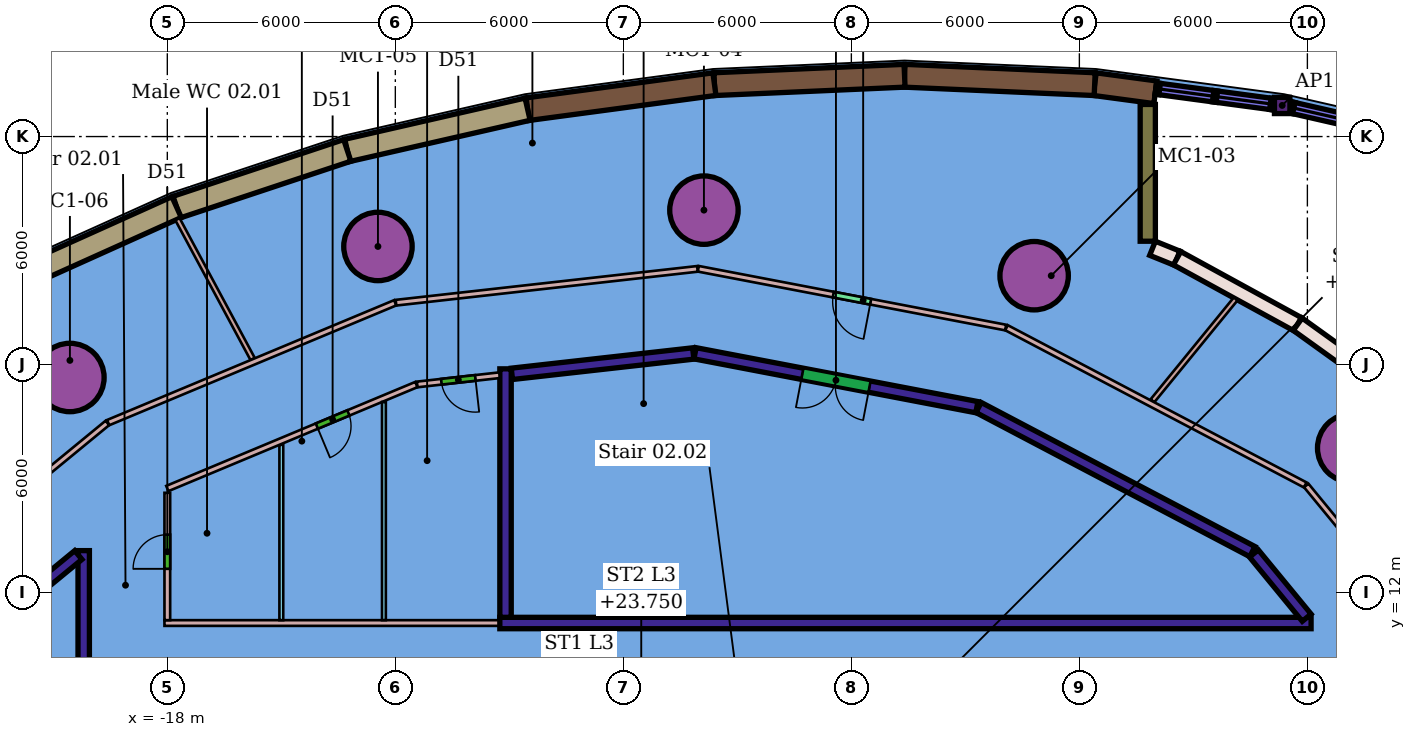
"""IFC4 building model, lengths in metres.
Left out: names, types, materials, properties, quantities, classifications, styles, units other than length and angle.
Written with IfcOpenShell. Run it as: python <this file> out.ifc"""

import sys

from ifc_helpers import new_model, si_unit, direction, frame, frame_2d, origin, origin_2d, place, context, subcontext, project, spatial, rectangle, hollow_circle, i_section, extrude, element, fill, save


model = new_model("IFC4")
c1 = context("Model", 3, precision=1e-05, world=origin(), true_north=direction((0.0, 1.0)))
c2 = subcontext(c1, "Body", "Model", "MODEL_VIEW")
j1 = project(units=[si_unit("LENGTHUNIT", "METRE"), si_unit("PLANEANGLEUNIT", "RADIAN")], contexts=[c1])
p1 = place(None, origin())
s1 = spatial("IfcSite", under=j1, at=p1, CompositionType="ELEMENT")
p2 = place(p1, origin())
s2 = spatial("IfcBuilding", under=s1, at=p2, CompositionType="ELEMENT")
p3 = place(p2, frame((0.0, 0.0, 17.0)))
s3 = spatial("IfcBuildingStorey", under=s2, at=p3, CompositionType="ELEMENT", Elevation=17.0)
for number, where, z_axis, x_axis in (
    (1, (13.166, 15.805, 0.0), (0.0, 0.0, 1.0), (1.0, 0.0, 0.0)),
    (2, (4.81, 20.339, 0.0), (0.0, 0.0, 1.0), (1.0, 0.0, 0.0)),
    (3, (-3.879, 22.064, 0.0), (0.0, 0.0, 1.0), (1.0, 0.0, 0.0)),
    (4, (-12.458, 21.108, 0.0), (0.0, 0.0, 1.0), (1.0, 0.0, 0.0)),
    (5, (-20.563, 17.66, 0.0), (0.0, 0.0, 1.0), (1.0, 0.0, 0.0)),
):
    element("IfcColumn", number, at=place(p3, frame(where, z_axis=z_axis, x_axis=x_axis)), inside=s3, PredefinedType="COLUMN", context=c2, shape_type="SweptSolid", body=[
        extrude(hollow_circle(Radius=0.9, WallThickness=0.06, at=origin_2d()), origin(), (0.0, 0.0, 1.0), 8.8),
    ])
p4 = place(p3, frame((11.337, 24.819, 0.0), z_axis=(0.0, 0.0, 1.0), x_axis=(1.0, 0.0, 0.0)))
e6 = element("IfcColumn", 6, at=p4, inside=s3, PredefinedType="COLUMN", context=c2, shape_type="SweptSolid", body=[
    extrude(i_section(OverallWidth=0.407, OverallDepth=0.428, WebThickness=0.02, FlangeThickness=0.035, at=origin_2d()), origin(), (0.0, 0.0, 1.0), 8.8),
])
p5 = place(p3, frame((-18.075, 11.2, 0.0), z_axis=(0.0, 0.0, 1.0), x_axis=(1.0, 0.0, 0.0)))
e7 = element("IfcWall", 7, at=p5, inside=s3, PredefinedType="PARTITIONING", context=c2, shape_type="SweptSolid", body=[
    extrude(rectangle(XDim=8.825, YDim=0.15, at=frame_2d((4.413, 0.0))), origin(), (0.0, 0.0, 1.0), 8.35),
])
p6 = place(p3, frame((-9.25, 11.2, 0.0), z_axis=(0.0, 0.0, 1.0), x_axis=(1.0, 0.0, 0.0)))
e8 = element("IfcWall", 8, at=p6, inside=s3, PredefinedType="PARTITIONING", context=c2, shape_type="SweptSolid", body=[
    extrude(rectangle(XDim=21.348, YDim=0.3, at=frame_2d((10.674, 0.0))), origin(), (0.0, 0.0, 1.0), 8.35),
])
p7 = place(p3, frame((-20.2, -9.15, 0.0), z_axis=(0.0, 0.0, 1.0), x_axis=(0.0, 1.0, 0.0)))
e9 = element("IfcWall", 9, at=p7, inside=s3, PredefinedType="PARTITIONING", context=c2, shape_type="SweptSolid", body=[
    extrude(rectangle(XDim=22.255, YDim=0.3, at=frame_2d((11.127, 0.0))), origin(), (0.0, 0.0, 1.0), 8.35),
])
p8 = place(p3, frame((-18.0, 11.275, 0.0), z_axis=(0.0, 0.0, 1.0), x_axis=(0.0, 1.0, 0.0)))
e10 = element("IfcWall", 10, at=p8, inside=s3, PredefinedType="PARTITIONING", context=c2, shape_type="SweptSolid", body=[
    extrude(rectangle(XDim=3.351, YDim=0.15, at=frame_2d((1.676, 0.0))), origin(), (0.0, 0.0, 1.0), 8.35),
])
p9 = place(p8, frame((1.351, 0.0, 0.0)))
e11 = element("IfcOpeningElement", 11, at=p9, cuts=e10, PredefinedType="OPENING", context=c2, shape_type="SweptSolid", body=[
    extrude(rectangle(XDim=0.9, YDim=2.1, at=frame_2d((0.45, 1.05))), frame((0.0, 0.085, 0.0), z_axis=(0.0, -1.0, 0.0), x_axis=(1.0, 0.0, 0.0)), (0.0, 0.0, 1.0), 0.17),
])
p10 = place(p3, frame((-15.0, 11.275, 0.0), z_axis=(0.0, 0.0, 1.0), x_axis=(0.0, 1.0, 0.0)))
e12 = element("IfcWall", 12, at=p10, inside=s3, PredefinedType="PARTITIONING", context=c2, shape_type="SweptSolid", body=[
    extrude(rectangle(XDim=4.614, YDim=0.1, at=frame_2d((2.307, 0.0))), origin(), (0.0, 0.0, 1.0), 8.35),
])
p11 = place(p3, frame((-11.447, 17.475, 0.0), z_axis=(0.0, 0.0, 1.0), x_axis=(-0.922815313154, -0.385242647961, 0.0)))
e13 = element("IfcWall", 13, at=p11, inside=s3, PredefinedType="PARTITIONING", context=c2, shape_type="SweptSolid", body=[
    extrude(rectangle(XDim=7.102, YDim=0.15, at=frame_2d((3.551, 0.0))), origin(), (0.0, 0.0, 1.0), 8.35),
])
p12 = place(p11, frame((1.938, 0.0, 0.0)))
e14 = element("IfcOpeningElement", 14, at=p12, cuts=e13, PredefinedType="OPENING", context=c2, shape_type="SweptSolid", body=[
    extrude(rectangle(XDim=0.9, YDim=2.1, at=frame_2d((0.45, 1.05))), frame((0.0, 0.085, 0.0), z_axis=(0.0, -1.0, 0.0), x_axis=(1.0, 0.0, 0.0)), (0.0, 0.0, 1.0), 0.17),
])
p13 = place(p3, frame((-12.3, 11.275, 0.0), z_axis=(0.0, 0.0, 1.0), x_axis=(0.0, 1.0, 0.0)))
e15 = element("IfcWall", 15, at=p13, inside=s3, PredefinedType="PARTITIONING", context=c2, shape_type="SweptSolid", body=[
    extrude(rectangle(XDim=5.741, YDim=0.1, at=frame_2d((2.871, 0.0))), origin(), (0.0, 0.0, 1.0), 8.35),
])
p14 = place(p3, frame((-9.1, 11.35, 0.0), z_axis=(0.0, 0.0, 1.0), x_axis=(0.0, 1.0, 0.0)))
e16 = element("IfcWall", 16, at=p14, inside=s3, PredefinedType="PARTITIONING", context=c2, shape_type="SweptSolid", body=[
    extrude(rectangle(XDim=6.538, YDim=0.3, at=frame_2d((3.269, 0.0))), origin(), (0.0, 0.0, 1.0), 8.35),
])
p15 = place(p3, frame((-9.258, 17.72, 0.0), z_axis=(0.0, 0.0, 1.0), x_axis=(-0.993760208046, -0.111537656887, 0.0)))
e17 = element("IfcWall", 17, at=p15, inside=s3, PredefinedType="PARTITIONING", context=c2, shape_type="SweptSolid", body=[
    extrude(rectangle(XDim=2.18, YDim=0.15, at=frame_2d((1.09, 0.0))), origin(), (0.0, 0.0, 1.0), 8.35),
])
p16 = place(p15, frame((0.64, 0.0, 0.0)))
e18 = element("IfcOpeningElement", 18, at=p16, cuts=e17, PredefinedType="OPENING", context=c2, shape_type="SweptSolid", body=[
    extrude(rectangle(XDim=0.9, YDim=2.1, at=frame_2d((0.45, 1.05))), frame((0.0, 0.085, 0.0), z_axis=(0.0, -1.0, 0.0), x_axis=(1.0, 0.0, 0.0)), (0.0, 0.0, 1.0), 0.17),
])
p17 = place(p3, frame((3.303, 16.879, 0.0), z_axis=(0.0, 0.0, 1.0), x_axis=(-0.982202179266, 0.18782672612, 0.0)))
e19 = element("IfcWall", 19, at=p17, inside=s3, PredefinedType="PARTITIONING", context=c2, shape_type="SweptSolid", body=[
    extrude(rectangle(XDim=7.551, YDim=0.3, at=frame_2d((3.775, 0.0))), origin(), (0.0, 0.0, 1.0), 8.35),
])
p18 = place(p17, frame((2.875, 0.0, 0.0)))
e20 = element("IfcOpeningElement", 20, at=p18, cuts=e19, PredefinedType="OPENING", context=c2, shape_type="SweptSolid", body=[
    extrude(rectangle(XDim=1.8, YDim=2.4, at=frame_2d((0.9, 1.2))), frame((0.0, 0.16, 0.0), z_axis=(0.0, -1.0, 0.0), x_axis=(1.0, 0.0, 0.0)), (0.0, 0.0, 1.0), 0.32),
])
p19 = place(p3, frame((3.348, 16.871, 0.0), z_axis=(0.0, 0.0, 1.0), x_axis=(0.884926027541, -0.46573160273, 0.0)))
e21 = element("IfcWall", 21, at=p19, inside=s3, PredefinedType="PARTITIONING", context=c2, shape_type="SweptSolid", body=[
    extrude(rectangle(XDim=8.142, YDim=0.3, at=frame_2d((4.071, 0.0))), origin(), (0.0, 0.0, 1.0), 8.35),
])
p20 = place(p3, frame((10.593, 13.03, 0.0), z_axis=(0.0, 0.0, 1.0), x_axis=(0.635029890501, -0.772487565058, 0.0)))
e22 = element("IfcWall", 22, at=p20, inside=s3, PredefinedType="PARTITIONING", context=c2, shape_type="SweptSolid", body=[
    extrude(rectangle(XDim=2.186, YDim=0.3, at=frame_2d((1.093, 0.0))), origin(), (0.0, 0.0, 1.0), 8.35),
])
p21 = place(p3, frame((-8.933, 17.757, 0.0), z_axis=(0.0, 0.0, 1.0), x_axis=(0.993757895817, 0.111558256089, 0.0)))
e23 = element("IfcWall", 23, at=p21, inside=s3, PredefinedType="PARTITIONING", context=c2, shape_type="SweptSolid", body=[
    extrude(rectangle(XDim=4.804, YDim=0.3, at=frame_2d((2.402, 0.0))), origin(), (0.0, 0.0, 1.0), 8.35),
])
p22 = place(p3, frame((-20.341, 12.989, 0.0), z_axis=(0.0, 0.0, 1.0), x_axis=(-0.772581343642, -0.634915795564, 0.0)))
e24 = element("IfcWall", 24, at=p22, inside=s3, PredefinedType="PARTITIONING", context=c2, shape_type="SweptSolid", body=[
    extrude(rectangle(XDim=5.549, YDim=0.3, at=frame_2d((2.774, 0.0))), origin(), (0.0, 0.0, 1.0), 8.35),
])
p23 = place(p22, frame((1.875, 0.0, 0.0)))
e25 = element("IfcOpeningElement", 25, at=p23, cuts=e24, PredefinedType="OPENING", context=c2, shape_type="SweptSolid", body=[
    extrude(rectangle(XDim=1.8, YDim=2.4, at=frame_2d((0.9, 1.2))), frame((0.0, 0.16, 0.0), z_axis=(0.0, -1.0, 0.0), x_axis=(1.0, 0.0, 0.0)), (0.0, 0.0, 1.0), 0.32),
])
p24 = place(p3, frame((7.924, 17.048, 0.0), z_axis=(0.0, 0.0, 1.0), x_axis=(0.632553618191, 0.774516571878, 0.0)))
e26 = element("IfcWall", 26, at=p24, inside=s3, PredefinedType="PARTITIONING", context=c2, shape_type="SweptSolid", body=[
    extrude(rectangle(XDim=3.46, YDim=0.125, at=frame_2d((1.73, 0.0))), origin(), (0.0, 0.0, 1.0), 8.35),
])
p25 = place(p3, frame((18.06, 7.411, 0.0), z_axis=(0.0, 0.0, 1.0), x_axis=(-0.63502168635, 0.772494309277, 0.0)))
e27 = element("IfcWall", 27, at=p25, inside=s3, PredefinedType="PARTITIONING", context=c2, shape_type="SweptSolid", body=[
    extrude(rectangle(XDim=9.59, YDim=0.15, at=frame_2d((4.795, 0.0))), origin(), (0.0, 0.0, 1.0), 8.35),
])
p26 = place(p25, frame((4.422, 0.0, 0.0)))
e28 = element("IfcOpeningElement", 28, at=p26, cuts=e27, PredefinedType="OPENING", context=c2, shape_type="SweptSolid", body=[
    extrude(rectangle(XDim=1.0, YDim=2.1, at=frame_2d((0.5, 1.05))), frame((0.0, 0.085, 0.0), z_axis=(0.0, -1.0, 0.0), x_axis=(1.0, 0.0, 0.0)), (0.0, 0.0, 1.0), 0.17),
])
p27 = place(p3, frame((4.083, 18.97, 0.0), z_axis=(0.0, 0.0, 1.0), x_axis=(0.884920607371, -0.465741901326, 0.0)))
e29 = element("IfcWall", 29, at=p27, inside=s3, PredefinedType="PARTITIONING", context=c2, shape_type="SweptSolid", body=[
    extrude(rectangle(XDim=8.882, YDim=0.15, at=frame_2d((4.441, 0.0))), origin(), (0.0, 0.0, 1.0), 8.35),
])
p28 = place(p3, frame((-17.732, 21.826, 0.0), z_axis=(0.0, 0.0, 1.0), x_axis=(0.473447649948, -0.880821958604, 0.0)))
e30 = element("IfcWall", 30, at=p28, inside=s3, PredefinedType="PARTITIONING", context=c2, shape_type="SweptSolid", body=[
    extrude(rectangle(XDim=4.175, YDim=0.125, at=frame_2d((2.088, 0.0))), origin(), (0.0, 0.0, 1.0), 8.35),
])
p29 = place(p3, frame((4.06, 18.975, 0.0), z_axis=(0.0, 0.0, 1.0), x_axis=(-0.982207009241, 0.187801466976, 0.0)))
e31 = element("IfcWall", 31, at=p29, inside=s3, PredefinedType="PARTITIONING", context=c2, shape_type="SweptSolid", body=[
    extrude(rectangle(XDim=8.234, YDim=0.15, at=frame_2d((4.117, 0.0))), origin(), (0.0, 0.0, 1.0), 8.35),
])
p30 = place(p29, frame((3.617, 0.0, 0.0)))
e32 = element("IfcOpeningElement", 32, at=p30, cuts=e31, PredefinedType="OPENING", context=c2, shape_type="SweptSolid", body=[
    extrude(rectangle(XDim=1.0, YDim=2.1, at=frame_2d((0.5, 1.05))), frame((0.0, 0.085, 0.0), z_axis=(0.0, -1.0, 0.0), x_axis=(1.0, 0.0, 0.0)), (0.0, 0.0, 1.0), 0.17),
])
p31 = place(p3, frame((-11.982, 19.628, 0.0), z_axis=(0.0, 0.0, 1.0), x_axis=(0.993764533241, 0.11149911422, 0.0)))
e33 = element("IfcWall", 33, at=p31, inside=s3, PredefinedType="PARTITIONING", context=c2, shape_type="SweptSolid", body=[
    extrude(rectangle(XDim=7.981, YDim=0.15, at=frame_2d((3.991, 0.0))), origin(), (0.0, 0.0, 1.0), 8.35),
])
p32 = place(p3, frame((-19.556, 16.473, 0.0), z_axis=(0.0, 0.0, 1.0), x_axis=(0.922818121352, 0.385235921097, 0.0)))
e34 = element("IfcWall", 34, at=p32, inside=s3, PredefinedType="PARTITIONING", context=c2, shape_type="SweptSolid", body=[
    extrude(rectangle(XDim=8.184, YDim=0.15, at=frame_2d((4.092, 0.0))), origin(), (0.0, 0.0, 1.0), 8.35),
])
p33 = place(p3, frame((-19.577, 16.465, 0.0), z_axis=(0.0, 0.0, 1.0), x_axis=(-0.772575830308, -0.634922504266, 0.0)))
e35 = element("IfcWall", 35, at=p33, inside=s3, PredefinedType="PARTITIONING", context=c2, shape_type="SweptSolid", body=[
    extrude(rectangle(XDim=8.815, YDim=0.15, at=frame_2d((4.407, 0.0))), origin(), (0.0, 0.0, 1.0), 8.35),
])
p34 = place(p33, frame((3.907, 0.0, 0.0)))
e36 = element("IfcOpeningElement", 36, at=p34, cuts=e35, PredefinedType="OPENING", context=c2, shape_type="SweptSolid", body=[
    extrude(rectangle(XDim=1.0, YDim=2.1, at=frame_2d((0.5, 1.05))), frame((0.0, 0.085, 0.0), z_axis=(0.0, -1.0, 0.0), x_axis=(1.0, 0.0, 0.0)), (0.0, 0.0, 1.0), 0.17),
])
p35 = place(p3, frame((8.0, 25.165, 0.0), z_axis=(0.0, 0.0, 1.0), x_axis=(-0.991131029833, 0.132888230112, 0.0)))
e37 = element("IfcWall", 37, at=p35, inside=s3, PredefinedType="SOLIDWALL", context=c2, shape_type="SweptSolid", body=[
    extrude(rectangle(XDim=1.611, YDim=0.6, at=frame_2d((0.806, 0.0))), origin(), (0.0, 0.0, 1.0), 8.8),
])
p36 = place(p3, frame((6.403, 25.379, 0.0), z_axis=(0.0, 0.0, 1.0), x_axis=(-0.99902630841, 0.044118421369, 0.0)))
e38 = element("IfcWall", 38, at=p36, inside=s3, PredefinedType="SOLIDWALL", context=c2, shape_type="SweptSolid", body=[
    extrude(rectangle(XDim=5.008, YDim=0.6, at=frame_2d((2.504, 0.0))), origin(), (0.0, 0.0, 1.0), 8.8),
])
p37 = place(p3, frame((1.4, 25.6, 0.0), z_axis=(0.0, 0.0, 1.0), x_axis=(-0.999026213515, -0.044120570136, 0.0)))
e39 = element("IfcWall", 39, at=p37, inside=s3, PredefinedType="SOLIDWALL", context=c2, shape_type="SweptSolid", body=[
    extrude(rectangle(XDim=5.008, YDim=0.6, at=frame_2d((2.504, 0.0))), origin(), (0.0, 0.0, 1.0), 8.8),
])
p38 = place(p3, frame((-3.603, 25.379, 0.0), z_axis=(0.0, 0.0, 1.0), x_axis=(-0.991143444913, -0.132795600853, 0.0)))
e40 = element("IfcWall", 40, at=p38, inside=s3, PredefinedType="SOLIDWALL", context=c2, shape_type="SweptSolid", body=[
    extrude(rectangle(XDim=4.96, YDim=0.6, at=frame_2d((2.48, 0.0))), origin(), (0.0, 0.0, 1.0), 8.8),
])
p39 = place(p3, frame((-8.519, 24.72, 0.0), z_axis=(0.0, 0.0, 1.0), x_axis=(-0.97483982486, -0.222906518224, 0.0)))
e41 = element("IfcWall", 41, at=p39, inside=s3, PredefinedType="SOLIDWALL", context=c2, shape_type="SweptSolid", body=[
    extrude(rectangle(XDim=4.867, YDim=0.6, at=frame_2d((2.434, 0.0))), origin(), (0.0, 0.0, 1.0), 8.4),
])
p40 = place(p3, frame((-13.264, 23.635, 0.0), z_axis=(0.0, 0.0, 1.0), x_axis=(-0.94901810672, -0.315221561949, 0.0)))
e42 = element("IfcWall", 42, at=p40, inside=s3, PredefinedType="SOLIDWALL", context=c2, shape_type="SweptSolid", body=[
    extrude(rectangle(XDim=4.732, YDim=0.6, at=frame_2d((2.366, 0.0))), origin(), (0.0, 0.0, 1.0), 8.4),
])
p41 = place(p3, frame((-17.755, 22.144, 0.0), z_axis=(0.0, 0.0, 1.0), x_axis=(-0.911894462824, -0.410424766152, 0.0)))
e43 = element("IfcWall", 43, at=p41, inside=s3, PredefinedType="SOLIDWALL", context=c2, shape_type="SweptSolid", body=[
    extrude(rectangle(XDim=4.561, YDim=0.6, at=frame_2d((2.281, 0.0))), origin(), (0.0, 0.0, 1.0), 8.4),
])
p42 = place(p3, frame((7.925, 21.061, 0.0), z_axis=(0.0, 0.0, 1.0), x_axis=(0.927141159757, -0.374712249444, 0.0)))
e44 = element("IfcWall", 44, at=p42, inside=s3, PredefinedType="SOLIDWALL", context=c2, shape_type="SweptSolid", body=[
    extrude(rectangle(XDim=0.697, YDim=0.4, at=frame_2d((0.348, 0.0))), origin(), (0.0, 0.0, 1.0), 8.4),
])
p43 = place(p3, frame((8.571, 20.8, 0.0), z_axis=(0.0, 0.0, 1.0), x_axis=(0.87711318505, -0.48028372928, 0.0)))
e45 = element("IfcWall", 45, at=p43, inside=s3, PredefinedType="SOLIDWALL", context=c2, shape_type="SweptSolid", body=[
    extrude(rectangle(XDim=3.619, YDim=0.4, at=frame_2d((1.809, 0.0))), origin(), (0.0, 0.0, 1.0), 8.4),
])
p44 = place(p3, frame((11.745, 19.062, 0.0), z_axis=(0.0, 0.0, 1.0), x_axis=(0.81205624831, -0.583579171648, 0.0)))
e46 = element("IfcWall", 46, at=p44, inside=s3, PredefinedType="SOLIDWALL", context=c2, shape_type="SweptSolid", body=[
    extrude(rectangle(XDim=3.538, YDim=0.4, at=frame_2d((1.769, 0.0))), origin(), (0.0, 0.0, 1.0), 8.4),
])
p45 = place(p3, frame((7.8, 24.845, 0.0), z_axis=(0.0, 0.0, 1.0), x_axis=(0.0, -1.0, 0.0)))
e47 = element("IfcWall", 47, at=p45, inside=s3, PredefinedType="SOLIDWALL", context=c2, shape_type="SweptSolid", body=[
    extrude(rectangle(XDim=3.599, YDim=0.4, at=frame_2d((1.8, 0.0))), origin(), (0.0, 0.0, 1.0), 8.8),
])
p46 = place(p9, origin())
e48 = element("IfcDoor", 48, at=p46, inside=s3, OperationType="SINGLE_SWING_LEFT", PredefinedType="DOOR", context=c2, shape_type="SweptSolid", body=[
    extrude(rectangle(XDim=0.9, YDim=2.1, at=frame_2d((0.45, 1.05))), frame((0.0, 0.025, 0.0), z_axis=(0.0, -1.0, 0.0), x_axis=(1.0, 0.0, 0.0)), (0.0, 0.0, 1.0), 0.05),
])
fill(e11, e48)
p47 = place(p12, origin())
e49 = element("IfcDoor", 49, at=p47, inside=s3, OperationType="SINGLE_SWING_RIGHT", PredefinedType="DOOR", context=c2, shape_type="SweptSolid", body=[
    extrude(rectangle(XDim=0.9, YDim=2.1, at=frame_2d((0.45, 1.05))), frame((0.0, 0.025, 0.0), z_axis=(0.0, -1.0, 0.0), x_axis=(1.0, 0.0, 0.0)), (0.0, 0.0, 1.0), 0.05),
])
fill(e14, e49)
p48 = place(p16, origin())
e50 = element("IfcDoor", 50, at=p48, inside=s3, OperationType="SINGLE_SWING_LEFT", PredefinedType="DOOR", context=c2, shape_type="SweptSolid", body=[
    extrude(rectangle(XDim=0.9, YDim=2.1, at=frame_2d((0.45, 1.05))), frame((0.0, 0.025, 0.0), z_axis=(0.0, -1.0, 0.0), x_axis=(1.0, 0.0, 0.0)), (0.0, 0.0, 1.0), 0.05),
])
fill(e18, e50)
p49 = place(p18, origin())
e51 = element("IfcDoor", 51, at=p49, inside=s3, OperationType="DOUBLE_DOOR_SINGLE_SWING", PredefinedType="DOOR", context=c2, shape_type="SweptSolid", body=[
    extrude(rectangle(XDim=1.8, YDim=2.4, at=frame_2d((0.9, 1.2))), frame((0.0, 0.025, 0.0), z_axis=(0.0, -1.0, 0.0), x_axis=(1.0, 0.0, 0.0)), (0.0, 0.0, 1.0), 0.05),
])
fill(e20, e51)
p50 = place(p30, origin())
e52 = element("IfcDoor", 52, at=p50, inside=s3, OperationType="SINGLE_SWING_LEFT", PredefinedType="DOOR", context=c2, shape_type="SweptSolid", body=[
    extrude(rectangle(XDim=1.0, YDim=2.1, at=frame_2d((0.5, 1.05))), frame((0.0, 0.025, 0.0), z_axis=(0.0, -1.0, 0.0), x_axis=(1.0, 0.0, 0.0)), (0.0, 0.0, 1.0), 0.05),
])
fill(e32, e52)
save(model, sys.argv[1])
